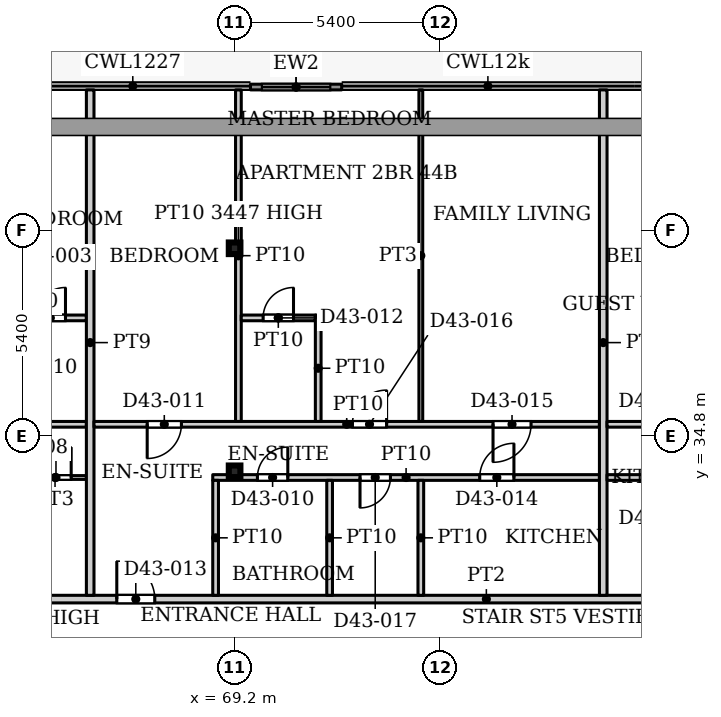
"""IFC4 building model, lengths in metres.
Left out: names, types, materials, properties, quantities, classifications, styles, units other than length and angle.
Written with IfcOpenShell. Run it as: python <this file> out.ifc"""

import sys

from ifc_helpers import new_model, si_unit, direction, frame, frame_2d, origin, origin_2d, place, context, subcontext, project, spatial, rectangle, hollow_rectangle, extrude, source, transform, mapped, element, fill, save


model = new_model("IFC4")
c1 = context("Model", 3, precision=1e-05, world=origin(), true_north=direction((0.0, 1.0)))
c2 = subcontext(c1, "Body", "Model", "MODEL_VIEW")
j1 = project(units=[si_unit("LENGTHUNIT", "METRE"), si_unit("PLANEANGLEUNIT", "RADIAN")], contexts=[c1])
p1 = place(None, origin())
s1 = spatial("IfcSite", under=j1, at=p1, CompositionType="ELEMENT")
p2 = place(p1, origin())
s2 = spatial("IfcBuilding", under=s1, at=p2, CompositionType="ELEMENT")
p3 = place(p2, frame((0.0, 0.0, 187.7)))
s3 = spatial("IfcBuildingStorey", under=s2, at=p3, CompositionType="ELEMENT", Elevation=187.7)
for number, where, z_axis, x_axis in (
    (1, (69.2, 33.863, 0.0), (0.0, 0.0, 1.0), (1.0, 0.0, 0.0)),
    (2, (69.2, 39.732, 0.0), (0.0, 0.0, 1.0), (1.0, 0.0, 0.0)),
):
    element("IfcColumn", number, at=place(p3, frame(where, z_axis=z_axis, x_axis=x_axis)), inside=s3, PredefinedType="COLUMN", context=c2, shape_type="SweptSolid", body=[
        extrude(hollow_rectangle(XDim=0.305, YDim=0.305, WallThickness=0.016, InnerFilletRadius=0.016, OuterFilletRadius=0.032, at=origin_2d()), origin(), (0.0, 0.0, 1.0), 3.9),
    ])
p4 = place(p3, frame((69.618, 43.975, 0.0), z_axis=(0.0, 0.0, 1.0), x_axis=(1.0, 0.0, 0.0)))
e3 = element("IfcWall", 3, at=p4, inside=s3, PredefinedType="SOLIDWALL", context=c2, shape_type="SweptSolid", body=[
    extrude(rectangle(XDim=2.4, YDim=0.15, at=frame_2d((1.2, 0.0))), origin(), (0.0, 0.0, 1.0), 3.75),
])
p5 = place(p4, frame((0.3, 0.0, 0.0)))
e4 = element("IfcOpeningElement", 4, at=p5, cuts=e3, PredefinedType="OPENING", context=c2, shape_type="SweptSolid", body=[
    extrude(rectangle(XDim=1.8, YDim=2.4, at=frame_2d((0.9, 1.2))), frame((0.0, 0.085, 0.0), z_axis=(0.0, -1.0, 0.0), x_axis=(1.0, 0.0, 0.0)), (0.0, 0.0, 1.0), 0.17),
])
p6 = place(p3, frame((53.549, 30.5, 0.0), z_axis=(0.0, 0.0, 1.0), x_axis=(1.0, 0.0, 0.0)))
e5 = element("IfcWall", 5, at=p6, inside=s3, PredefinedType="PARTITIONING", context=c2, shape_type="SweptSolid", body=[
    extrude(rectangle(XDim=44.551, YDim=0.2, at=frame_2d((22.275, 0.0))), origin(), (0.0, 0.0, 1.0), 3.6),
])
p7 = place(p6, frame((8.351, 0.0, 0.0)))
e6 = element("IfcOpeningElement", 6, at=p7, cuts=e5, PredefinedType="OPENING", context=c2, shape_type="SweptSolid", body=[
    extrude(rectangle(XDim=1.0, YDim=2.1, at=frame_2d((0.5, 1.05))), frame((0.0, 0.11, 0.0), z_axis=(0.0, -1.0, 0.0), x_axis=(1.0, 0.0, 0.0)), (0.0, 0.0, 1.0), 0.22),
])
p8 = place(p6, frame((12.551, 0.0, 0.0)))
e7 = element("IfcOpeningElement", 7, at=p8, cuts=e5, PredefinedType="OPENING", context=c2, shape_type="SweptSolid", body=[
    extrude(rectangle(XDim=1.0, YDim=2.1, at=frame_2d((0.5, 1.05))), frame((0.0, 0.11, 0.0), z_axis=(0.0, -1.0, 0.0), x_axis=(1.0, 0.0, 0.0)), (0.0, 0.0, 1.0), 0.22),
])
p9 = place(p6, frame((28.751, 0.0, 0.0)))
e8 = element("IfcOpeningElement", 8, at=p9, cuts=e5, PredefinedType="OPENING", context=c2, shape_type="SweptSolid", body=[
    extrude(rectangle(XDim=1.0, YDim=2.1, at=frame_2d((0.5, 1.05))), frame((0.0, 0.11, 0.0), z_axis=(0.0, -1.0, 0.0), x_axis=(1.0, 0.0, 0.0)), (0.0, 0.0, 1.0), 0.22),
])
p10 = place(p6, frame((40.751, 0.0, 0.0)))
e9 = element("IfcOpeningElement", 9, at=p10, cuts=e5, PredefinedType="OPENING", context=c2, shape_type="SweptSolid", body=[
    extrude(rectangle(XDim=1.0, YDim=2.1, at=frame_2d((0.5, 1.05))), frame((0.0, 0.11, 0.0), z_axis=(0.0, -1.0, 0.0), x_axis=(1.0, 0.0, 0.0)), (0.0, 0.0, 1.0), 0.22),
])
p11 = place(p3, frame((53.549, 35.1, 0.0), z_axis=(0.0, 0.0, 1.0), x_axis=(1.0, 0.0, 0.0)))
e10 = element("IfcWall", 10, at=p11, inside=s3, PredefinedType="PARTITIONING", context=c2, shape_type="SweptSolid", body=[
    extrude(rectangle(XDim=11.751, YDim=0.15, at=frame_2d((5.875, 0.0))), origin(), (0.0, 0.0, 1.0), 3.6),
])
p12 = place(p11, frame((5.551, 0.0, 0.0)))
e11 = element("IfcOpeningElement", 11, at=p12, cuts=e10, PredefinedType="OPENING", context=c2, shape_type="SweptSolid", body=[
    extrude(rectangle(XDim=0.9, YDim=2.1, at=frame_2d((0.45, 1.05))), frame((0.0, 0.085, 0.0), z_axis=(0.0, -1.0, 0.0), x_axis=(1.0, 0.0, 0.0)), (0.0, 0.0, 1.0), 0.17),
])
p13 = place(p11, frame((1.751, 0.0, 0.0)))
e12 = element("IfcOpeningElement", 12, at=p13, cuts=e10, PredefinedType="OPENING", context=c2, shape_type="SweptSolid", body=[
    extrude(rectangle(XDim=1.0, YDim=2.1, at=frame_2d((0.5, 1.05))), frame((0.0, 0.085, 0.0), z_axis=(0.0, -1.0, 0.0), x_axis=(1.0, 0.0, 0.0)), (0.0, 0.0, 1.0), 0.17),
])
p14 = place(p11, frame((8.101, 0.0, 0.0)))
e13 = element("IfcOpeningElement", 13, at=p14, cuts=e10, PredefinedType="OPENING", context=c2, shape_type="SweptSolid", body=[
    extrude(rectangle(XDim=0.9, YDim=2.1, at=frame_2d((0.45, 1.05))), frame((0.0, 0.085, 0.0), z_axis=(0.0, -1.0, 0.0), x_axis=(1.0, 0.0, 0.0)), (0.0, 0.0, 1.0), 0.17),
])
p15 = place(p3, frame((63.375, 37.9, 0.0), z_axis=(0.0, 0.0, 1.0), x_axis=(1.0, 0.0, 0.0)))
e14 = element("IfcWall", 14, at=p15, inside=s3, PredefinedType="PARTITIONING", context=c2, shape_type="SweptSolid", body=[
    extrude(rectangle(XDim=1.925, YDim=0.15, at=frame_2d((0.962, 0.0))), origin(), (0.0, 0.0, 1.0), 3.6),
])
p16 = place(p15, frame((0.575, 0.0, 0.0)))
e15 = element("IfcOpeningElement", 15, at=p16, cuts=e14, PredefinedType="OPENING", context=c2, shape_type="SweptSolid", body=[
    extrude(rectangle(XDim=0.8, YDim=2.1, at=frame_2d((0.4, 1.05))), frame((0.0, 0.085, 0.0), z_axis=(0.0, -1.0, 0.0), x_axis=(1.0, 0.0, 0.0)), (0.0, 0.0, 1.0), 0.17),
])
p17 = place(p3, frame((63.65, 33.7, 0.0), z_axis=(0.0, 0.0, 1.0), x_axis=(1.0, 0.0, 0.0)))
e16 = element("IfcWall", 16, at=p17, inside=s3, PredefinedType="PARTITIONING", context=c2, shape_type="SweptSolid", body=[
    extrude(rectangle(XDim=1.65, YDim=0.1, at=frame_2d((0.825, 0.0))), origin(), (0.0, 0.0, 1.0), 3.6),
])
p18 = place(p17, frame((0.45, 0.0, 0.0)))
e17 = element("IfcOpeningElement", 17, at=p18, cuts=e16, PredefinedType="OPENING", context=c2, shape_type="SweptSolid", body=[
    extrude(rectangle(XDim=0.8, YDim=2.1, at=frame_2d((0.4, 1.05))), frame((0.0, 0.06, 0.0), z_axis=(0.0, -1.0, 0.0), x_axis=(1.0, 0.0, 0.0)), (0.0, 0.0, 1.0), 0.12),
])
p19 = place(p3, frame((65.4, 30.6, 0.0), z_axis=(0.0, 0.0, 1.0), x_axis=(0.0, 1.0, 0.0)))
e18 = element("IfcWall", 18, at=p19, inside=s3, PredefinedType="PARTITIONING", context=c2, shape_type="SweptSolid", body=[
    extrude(rectangle(XDim=13.3, YDim=0.2, at=frame_2d((6.65, 0.0))), origin(), (0.0, 0.0, 1.0), 3.6),
])
p20 = place(p3, frame((65.5, 35.1, 0.0), z_axis=(0.0, 0.0, 1.0), x_axis=(1.0, 0.0, 0.0)))
e19 = element("IfcWall", 19, at=p20, inside=s3, PredefinedType="PARTITIONING", context=c2, shape_type="SweptSolid", body=[
    extrude(rectangle(XDim=13.3, YDim=0.15, at=frame_2d((6.65, 0.0))), origin(), (0.0, 0.0, 1.0), 3.6),
])
p21 = place(p20, frame((1.4, 0.0, 0.0)))
e20 = element("IfcOpeningElement", 20, at=p21, cuts=e19, PredefinedType="OPENING", context=c2, shape_type="SweptSolid", body=[
    extrude(rectangle(XDim=0.9, YDim=2.1, at=frame_2d((0.45, 1.05))), frame((0.0, 0.085, 0.0), z_axis=(0.0, -1.0, 0.0), x_axis=(1.0, 0.0, 0.0)), (0.0, 0.0, 1.0), 0.17),
])
p22 = place(p20, frame((10.5, 0.0, 0.0)))
e21 = element("IfcOpeningElement", 21, at=p22, cuts=e19, PredefinedType="OPENING", context=c2, shape_type="SweptSolid", body=[
    extrude(rectangle(XDim=1.0, YDim=2.1, at=frame_2d((0.5, 1.05))), frame((0.0, 0.085, 0.0), z_axis=(0.0, -1.0, 0.0), x_axis=(1.0, 0.0, 0.0)), (0.0, 0.0, 1.0), 0.17),
])
p23 = place(p20, frame((6.8, 0.0, 0.0)))
e22 = element("IfcOpeningElement", 22, at=p23, cuts=e19, PredefinedType="OPENING", context=c2, shape_type="SweptSolid", body=[
    extrude(rectangle(XDim=0.9, YDim=2.1, at=frame_2d((0.45, 1.05))), frame((0.0, 0.085, 0.0), z_axis=(0.0, -1.0, 0.0), x_axis=(1.0, 0.0, 0.0)), (0.0, 0.0, 1.0), 0.17),
])
p24 = place(p3, frame((68.625, 33.7, 0.0), z_axis=(0.0, 0.0, 1.0), x_axis=(1.0, 0.0, 0.0)))
e23 = element("IfcWall", 23, at=p24, inside=s3, PredefinedType="PARTITIONING", context=c2, shape_type="SweptSolid", body=[
    extrude(rectangle(XDim=10.175, YDim=0.15, at=frame_2d((5.087, 0.0))), origin(), (0.0, 0.0, 1.0), 3.6),
])
p25 = place(p24, frame((1.175, 0.0, 0.0)))
e24 = element("IfcOpeningElement", 24, at=p25, cuts=e23, PredefinedType="OPENING", context=c2, shape_type="SweptSolid", body=[
    extrude(rectangle(XDim=0.8, YDim=2.1, at=frame_2d((0.4, 1.05))), frame((0.0, 0.085, 0.0), z_axis=(0.0, -1.0, 0.0), x_axis=(1.0, 0.0, 0.0)), (0.0, 0.0, 1.0), 0.17),
])
p26 = place(p24, frame((7.025, 0.0, 0.0)))
e25 = element("IfcOpeningElement", 25, at=p26, cuts=e23, PredefinedType="OPENING", context=c2, shape_type="SweptSolid", body=[
    extrude(rectangle(XDim=0.9, YDim=2.1, at=frame_2d((0.45, 1.05))), frame((0.0, 0.085, 0.0), z_axis=(0.0, -1.0, 0.0), x_axis=(1.0, 0.0, 0.0)), (0.0, 0.0, 1.0), 0.17),
])
p27 = place(p24, frame((3.875, 0.0, 0.0)))
e26 = element("IfcOpeningElement", 26, at=p27, cuts=e23, PredefinedType="OPENING", context=c2, shape_type="SweptSolid", body=[
    extrude(rectangle(XDim=0.8, YDim=2.1, at=frame_2d((0.4, 1.05))), frame((0.0, 0.085, 0.0), z_axis=(0.0, -1.0, 0.0), x_axis=(1.0, 0.0, 0.0)), (0.0, 0.0, 1.0), 0.17),
])
p28 = place(p3, frame((68.7, 30.6, 0.0), z_axis=(0.0, 0.0, 1.0), x_axis=(0.0, 1.0, 0.0)))
e27 = element("IfcWall", 27, at=p28, inside=s3, PredefinedType="PARTITIONING", context=c2, shape_type="SweptSolid", body=[
    extrude(rectangle(XDim=3.025, YDim=0.15, at=frame_2d((1.512, 0.0))), origin(), (0.0, 0.0, 1.0), 3.6),
])
p29 = place(p3, frame((69.3, 35.175, 0.0), z_axis=(0.0, 0.0, 1.0), x_axis=(0.0, 1.0, 0.0)))
e28 = element("IfcWall", 28, at=p29, inside=s3, PredefinedType="PARTITIONING", context=c2, shape_type="SweptSolid", body=[
    extrude(rectangle(XDim=8.725, YDim=0.15, at=frame_2d((4.362, 0.0))), origin(), (0.0, 0.0, 1.0), 3.447),
])
p30 = place(p3, frame((69.375, 37.9, 0.0), z_axis=(0.0, 0.0, 1.0), x_axis=(1.0, 0.0, 0.0)))
e29 = element("IfcWall", 29, at=p30, inside=s3, PredefinedType="PARTITIONING", context=c2, shape_type="SweptSolid", body=[
    extrude(rectangle(XDim=1.95, YDim=0.15, at=frame_2d((0.975, 0.0))), origin(), (0.0, 0.0, 1.0), 3.6),
])
p31 = place(p30, frame((0.575, 0.0, 0.0)))
e30 = element("IfcOpeningElement", 30, at=p31, cuts=e29, PredefinedType="OPENING", context=c2, shape_type="SweptSolid", body=[
    extrude(rectangle(XDim=0.8, YDim=2.1, at=frame_2d((0.4, 1.05))), frame((0.0, 0.085, 0.0), z_axis=(0.0, -1.0, 0.0), x_axis=(1.0, 0.0, 0.0)), (0.0, 0.0, 1.0), 0.17),
])
p32 = place(p3, frame((71.4, 35.175, 0.0), z_axis=(0.0, 0.0, 1.0), x_axis=(0.0, 1.0, 0.0)))
e31 = element("IfcWall", 31, at=p32, inside=s3, PredefinedType="PARTITIONING", context=c2, shape_type="SweptSolid", body=[
    extrude(rectangle(XDim=2.8, YDim=0.15, at=frame_2d((1.4, 0.0))), origin(), (0.0, 0.0, 1.0), 3.6),
])
for number, where, z_axis, x_axis in (
    (32, (71.7, 30.6, 0.0), (0.0, 0.0, 1.0), (0.0, 1.0, 0.0)),
    (33, (74.1, 30.6, 0.0), (0.0, 0.0, 1.0), (0.0, 1.0, 0.0)),
):
    element("IfcWall", number, at=place(p3, frame(where, z_axis=z_axis, x_axis=x_axis)), inside=s3, PredefinedType="PARTITIONING", context=c2, shape_type="SweptSolid", body=[
        extrude(rectangle(XDim=3.025, YDim=0.15, at=frame_2d((1.512, 0.0))), origin(), (0.0, 0.0, 1.0), 3.6),
    ])
p33 = place(p3, frame((74.1, 35.175, 0.0), z_axis=(0.0, 0.0, 1.0), x_axis=(0.0, 1.0, 0.0)))
e34 = element("IfcWall", 34, at=p33, inside=s3, PredefinedType="PARTITIONING", context=c2, shape_type="SweptSolid", body=[
    extrude(rectangle(XDim=8.725, YDim=0.1, at=frame_2d((4.362, 0.0))), origin(), (0.0, 0.0, 1.0), 3.6),
])
p34 = place(p3, frame((78.9, 30.6, 0.0), z_axis=(0.0, 0.0, 1.0), x_axis=(0.0, 1.0, 0.0)))
e35 = element("IfcWall", 35, at=p34, inside=s3, PredefinedType="PARTITIONING", context=c2, shape_type="SweptSolid", body=[
    extrude(rectangle(XDim=13.3, YDim=0.2, at=frame_2d((6.65, 0.0))), origin(), (0.0, 0.0, 1.0), 3.6),
])
p35 = place(p3, frame((79.0, 33.7, 0.0), z_axis=(0.0, 0.0, 1.0), x_axis=(1.0, 0.0, 0.0)))
e36 = element("IfcWall", 36, at=p35, inside=s3, PredefinedType="PARTITIONING", context=c2, shape_type="SweptSolid", body=[
    extrude(rectangle(XDim=2.95, YDim=0.15, at=frame_2d((1.475, 0.0))), origin(), (0.0, 0.0, 1.0), 3.6),
])
p36 = place(p35, frame((0.95, 0.0, 0.0)))
e37 = element("IfcOpeningElement", 37, at=p36, cuts=e36, PredefinedType="OPENING", context=c2, shape_type="SweptSolid", body=[
    extrude(rectangle(XDim=0.9, YDim=2.1, at=frame_2d((0.45, 1.05))), frame((0.0, 0.085, 0.0), z_axis=(0.0, -1.0, 0.0), x_axis=(1.0, 0.0, 0.0)), (0.0, 0.0, 1.0), 0.17),
])
p37 = place(p3, frame((79.0, 35.1, 0.0), z_axis=(0.0, 0.0, 1.0), x_axis=(1.0, 0.0, 0.0)))
e38 = element("IfcWall", 38, at=p37, inside=s3, PredefinedType="PARTITIONING", context=c2, shape_type="SweptSolid", body=[
    extrude(rectangle(XDim=11.5, YDim=0.15, at=frame_2d((5.75, 0.0))), origin(), (0.0, 0.0, 1.0), 3.6),
])
p38 = place(p37, frame((0.95, 0.0, 0.0)))
e39 = element("IfcOpeningElement", 39, at=p38, cuts=e38, PredefinedType="OPENING", context=c2, shape_type="SweptSolid", body=[
    extrude(rectangle(XDim=0.9, YDim=2.1, at=frame_2d((0.45, 1.05))), frame((0.0, 0.085, 0.0), z_axis=(0.0, -1.0, 0.0), x_axis=(1.0, 0.0, 0.0)), (0.0, 0.0, 1.0), 0.17),
])
p39 = place(p37, frame((4.35, 0.0, 0.0)))
e40 = element("IfcOpeningElement", 40, at=p39, cuts=e38, PredefinedType="OPENING", context=c2, shape_type="SweptSolid", body=[
    extrude(rectangle(XDim=1.0, YDim=2.1, at=frame_2d((0.5, 1.05))), frame((0.0, 0.085, 0.0), z_axis=(0.0, -1.0, 0.0), x_axis=(1.0, 0.0, 0.0)), (0.0, 0.0, 1.0), 0.17),
])
p40 = place(p37, frame((9.8, 0.0, 0.0)))
e41 = element("IfcOpeningElement", 41, at=p40, cuts=e38, PredefinedType="OPENING", context=c2, shape_type="SweptSolid", body=[
    extrude(rectangle(XDim=0.9, YDim=2.1, at=frame_2d((0.45, 1.05))), frame((0.0, 0.085, 0.0), z_axis=(0.0, -1.0, 0.0), x_axis=(1.0, 0.0, 0.0)), (0.0, 0.0, 1.0), 0.17),
])
m1 = source(origin(), c2, "Body", "SweptSolid", [
    extrude(rectangle(XDim=1.8, YDim=2.4, at=frame_2d((0.9, 1.2))), frame((0.0, 0.025, 0.0), z_axis=(0.0, -1.0, 0.0), x_axis=(1.0, 0.0, 0.0)), (0.0, 0.0, 1.0), 0.05),
])
p41 = place(p5, origin())
e42 = element("IfcDoor", 42, at=p41, inside=s3, OperationType="SLIDING_TO_LEFT", PredefinedType="DOOR", context=c2, shape_type="MappedRepresentation", body=[
    mapped(m1, transform((0.0, 0.0, 0.0), x_axis=(1.0, 0.0, 0.0), y_axis=(0.0, 1.0, 0.0), z_axis=(0.0, 0.0, 1.0), scale=1.0)),
])
fill(e4, e42)
m2 = source(origin(), c2, "Body", "SweptSolid", [
    extrude(rectangle(XDim=0.8, YDim=2.1, at=frame_2d((0.4, 1.05))), frame((0.0, 0.025, 0.0), z_axis=(0.0, -1.0, 0.0), x_axis=(1.0, 0.0, 0.0)), (0.0, 0.0, 1.0), 0.05),
])
p42 = place(p16, origin())
e43 = element("IfcDoor", 43, at=p42, inside=s3, OperationType="SINGLE_SWING_LEFT", PredefinedType="DOOR", context=c2, shape_type="MappedRepresentation", body=[
    mapped(m2, transform((0.0, 0.0, 0.0), x_axis=(1.0, 0.0, 0.0), y_axis=(0.0, 1.0, 0.0), z_axis=(0.0, 0.0, 1.0), scale=1.0)),
])
fill(e15, e43)
p43 = place(p18, origin())
e44 = element("IfcDoor", 44, at=p43, inside=s3, OperationType="SINGLE_SWING_LEFT", PredefinedType="DOOR", context=c2, shape_type="MappedRepresentation", body=[
    mapped(m2, transform((0.0, 0.0, 0.0), x_axis=(1.0, 0.0, 0.0), y_axis=(0.0, 1.0, 0.0), z_axis=(0.0, 0.0, 1.0), scale=1.0)),
])
fill(e17, e44)
p44 = place(p25, origin())
e45 = element("IfcDoor", 45, at=p44, inside=s3, OperationType="SINGLE_SWING_LEFT", PredefinedType="DOOR", context=c2, shape_type="MappedRepresentation", body=[
    mapped(m2, transform((0.0, 0.0, 0.0), x_axis=(1.0, 0.0, 0.0), y_axis=(0.0, 1.0, 0.0), z_axis=(0.0, 0.0, 1.0), scale=1.0)),
])
fill(e24, e45)
m3 = source(origin(), c2, "Body", "SweptSolid", [
    extrude(rectangle(XDim=0.9, YDim=2.1, at=frame_2d((0.45, 1.05))), frame((0.0, 0.025, 0.0), z_axis=(0.0, -1.0, 0.0), x_axis=(1.0, 0.0, 0.0)), (0.0, 0.0, 1.0), 0.05),
])
p45 = place(p21, origin())
e46 = element("IfcDoor", 46, at=p45, inside=s3, OperationType="SINGLE_SWING_RIGHT", PredefinedType="DOOR", context=c2, shape_type="MappedRepresentation", body=[
    mapped(m3, transform((0.0, 0.0, 0.0), x_axis=(1.0, 0.0, 0.0), y_axis=(0.0, 1.0, 0.0), z_axis=(0.0, 0.0, 1.0), scale=1.0)),
])
fill(e20, e46)
p46 = place(p31, origin())
e47 = element("IfcDoor", 47, at=p46, inside=s3, OperationType="SINGLE_SWING_LEFT", PredefinedType="DOOR", context=c2, shape_type="MappedRepresentation", body=[
    mapped(m2, transform((0.0, 0.0, 0.0), x_axis=(1.0, 0.0, 0.0), y_axis=(0.0, 1.0, 0.0), z_axis=(0.0, 0.0, 1.0), scale=1.0)),
])
fill(e30, e47)
m4 = source(origin(), c2, "Body", "SweptSolid", [
    extrude(rectangle(XDim=1.0, YDim=2.1, at=frame_2d((0.5, 1.05))), frame((0.0, 0.025, 0.0), z_axis=(0.0, -1.0, 0.0), x_axis=(1.0, 0.0, 0.0)), (0.0, 0.0, 1.0), 0.05),
])
p47 = place(p8, origin())
e48 = element("IfcDoor", 48, at=p47, inside=s3, OperationType="SINGLE_SWING_LEFT", PredefinedType="DOOR", context=c2, shape_type="MappedRepresentation", body=[
    mapped(m4, transform((0.0, 0.0, 0.0), x_axis=(1.0, 0.0, 0.0), y_axis=(0.0, 1.0, 0.0), z_axis=(0.0, 0.0, 1.0), scale=1.0)),
])
fill(e7, e48)
p48 = place(p26, origin())
e49 = element("IfcDoor", 49, at=p48, inside=s3, OperationType="SINGLE_SWING_LEFT", PredefinedType="DOOR", context=c2, shape_type="MappedRepresentation", body=[
    mapped(m3, transform((0.0, 0.0, 0.0), x_axis=(1.0, 0.0, 0.0), y_axis=(0.0, 1.0, 0.0), z_axis=(0.0, 0.0, 1.0), scale=1.0)),
])
fill(e25, e49)
m5 = source(origin(), c2, "Body", "SweptSolid", [
    extrude(rectangle(XDim=1.0, YDim=2.1, at=frame_2d((0.5, 1.05))), frame((0.0, 0.025, 0.0), z_axis=(0.0, -1.0, 0.0), x_axis=(1.0, 0.0, 0.0)), (0.0, 0.0, 1.0), 0.05),
])
p49 = place(p22, origin())
e50 = element("IfcDoor", 50, at=p49, inside=s3, OperationType="SINGLE_SWING_RIGHT", PredefinedType="DOOR", context=c2, shape_type="MappedRepresentation", body=[
    mapped(m5, transform((0.0, 0.0, 0.0), x_axis=(1.0, 0.0, 0.0), y_axis=(0.0, 1.0, 0.0), z_axis=(0.0, 0.0, 1.0), scale=1.0)),
])
fill(e21, e50)
p50 = place(p23, origin())
e51 = element("IfcDoor", 51, at=p50, inside=s3, OperationType="SINGLE_SWING_LEFT", PredefinedType="DOOR", context=c2, shape_type="MappedRepresentation", body=[
    mapped(m3, transform((0.0, 0.0, 0.0), x_axis=(1.0, 0.0, 0.0), y_axis=(0.0, 1.0, 0.0), z_axis=(0.0, 0.0, 1.0), scale=1.0)),
])
fill(e22, e51)
p51 = place(p27, origin())
e52 = element("IfcDoor", 52, at=p51, inside=s3, OperationType="SINGLE_SWING_RIGHT", PredefinedType="DOOR", context=c2, shape_type="MappedRepresentation", body=[
    mapped(m2, transform((0.0, 0.0, 0.0), x_axis=(1.0, 0.0, 0.0), y_axis=(0.0, 1.0, 0.0), z_axis=(0.0, 0.0, 1.0), scale=1.0)),
])
fill(e26, e52)
save(model, sys.argv[1])
